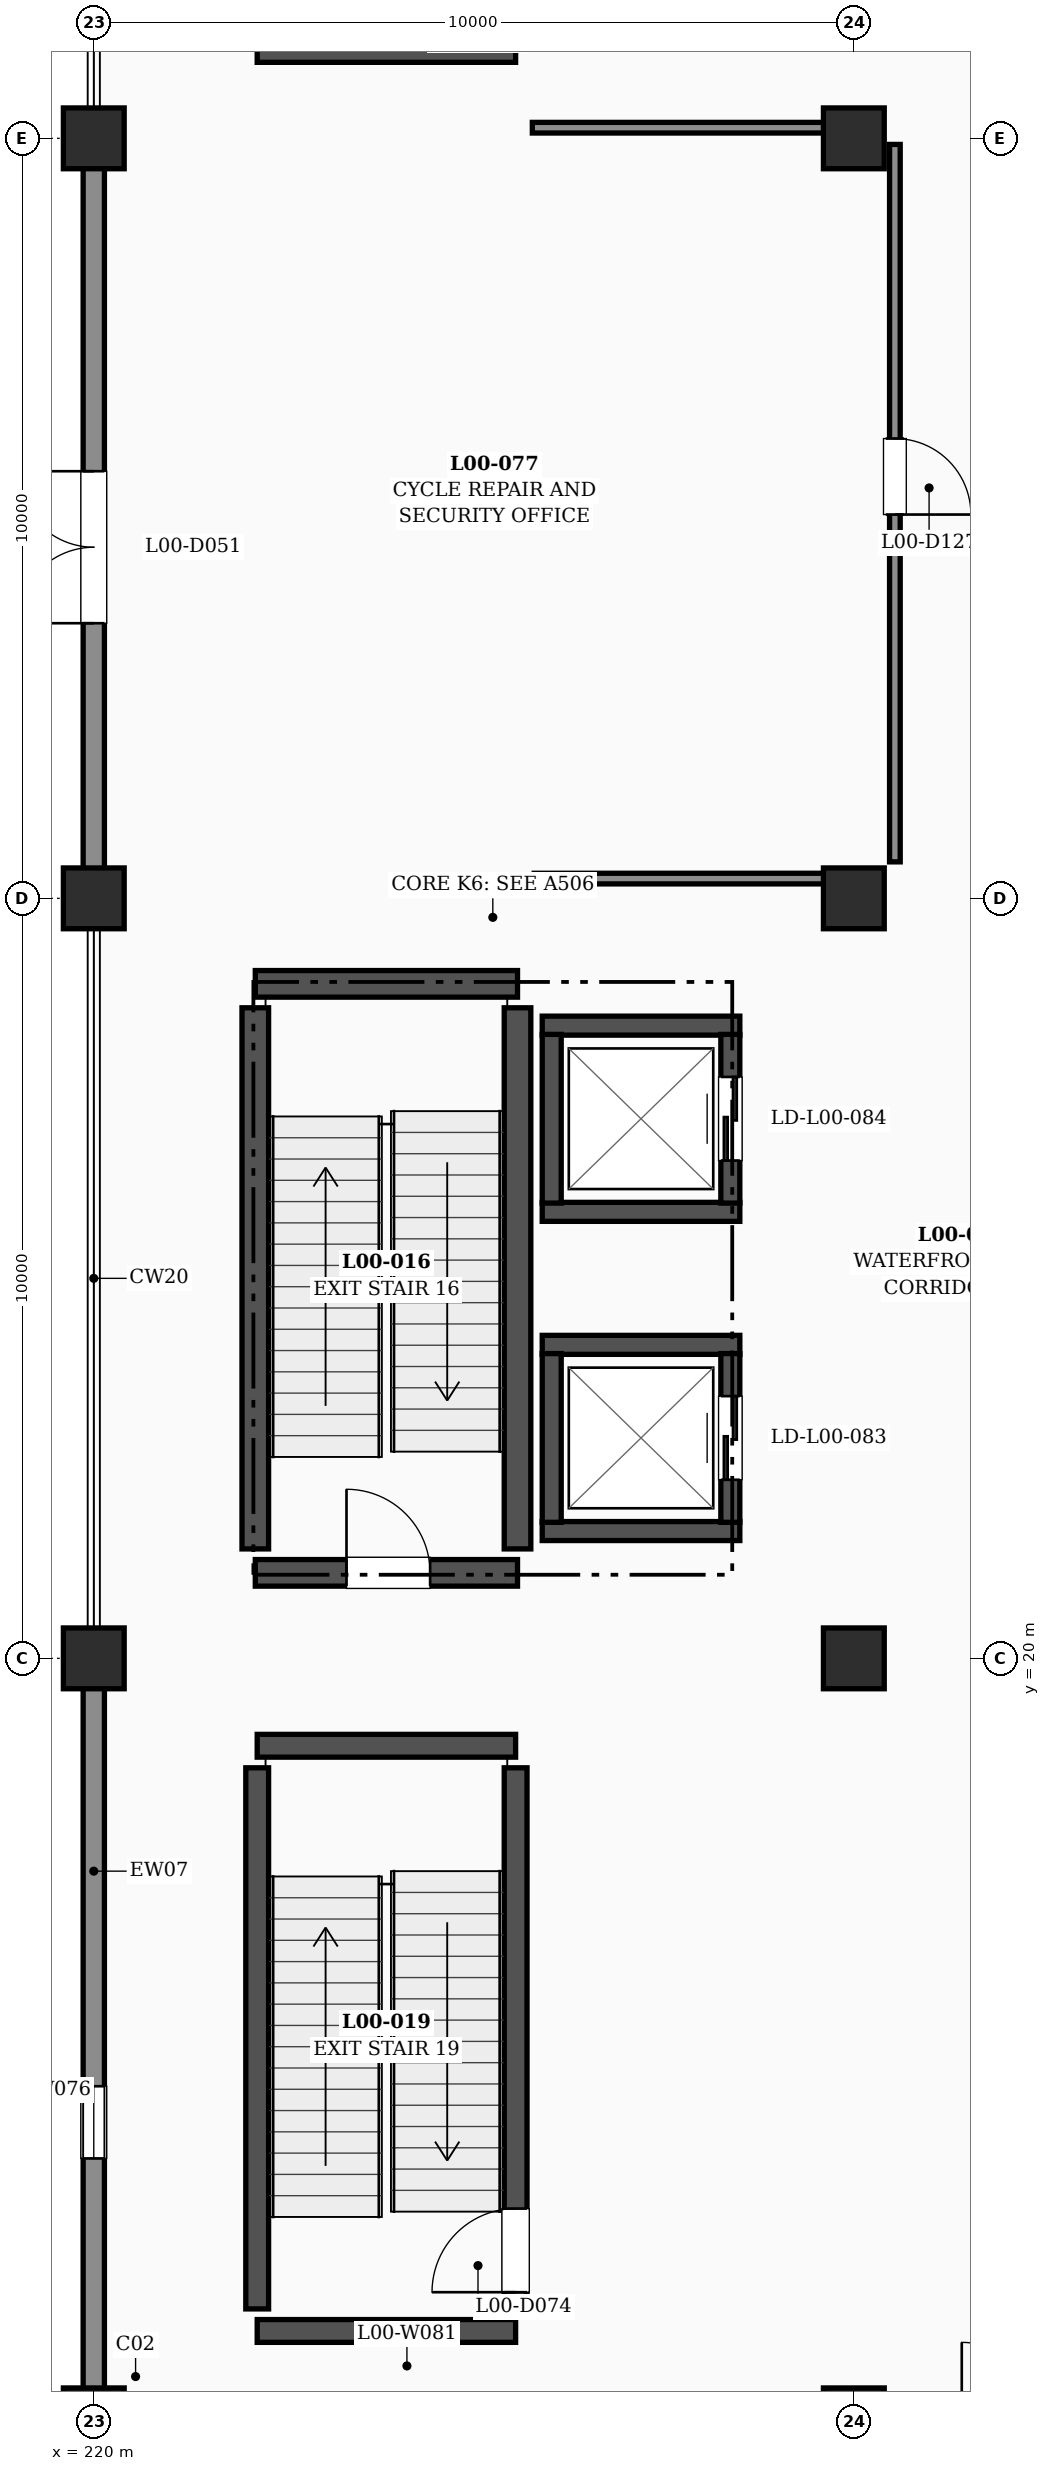
"""IFC4 building model, lengths in metres.
Left out: names, types, materials, properties, quantities, classifications, styles, units other than length and angle.
Written with IfcOpenShell. Run it as: python <this file> out.ifc"""

import sys

from ifc_helpers import new_model, si_unit, direction, frame, frame_2d, origin, origin_2d, place, context, subcontext, project, spatial, rectangle, extrude, element, fill, save


model = new_model("IFC4")
c1 = context("Model", 3, precision=1e-05, world=origin(), true_north=direction((0.0, 1.0)))
c2 = subcontext(c1, "Body", "Model", "MODEL_VIEW")
j1 = project(units=[si_unit("LENGTHUNIT", "METRE"), si_unit("PLANEANGLEUNIT", "RADIAN")], contexts=[c1])
p1 = place(None, origin())
s1 = spatial("IfcSite", under=j1, at=p1, CompositionType="ELEMENT")
p2 = place(p1, origin())
s2 = spatial("IfcBuilding", under=s1, at=p2, CompositionType="ELEMENT")
p3 = place(p2, origin())
s3 = spatial("IfcBuildingStorey", under=s2, at=p3, CompositionType="ELEMENT", Elevation=0.0)
for number, where, z_axis, x_axis in (
    (1, (220.0, 10.0, 0.0), (0.0, 0.0, 1.0), (1.0, 0.0, 0.0)),
    (2, (220.0, 20.0, 0.0), (0.0, 0.0, 1.0), (1.0, 0.0, 0.0)),
    (3, (220.0, 30.0, 0.0), (0.0, 0.0, 1.0), (1.0, 0.0, 0.0)),
    (4, (220.0, 40.0, 0.0), (0.0, 0.0, 1.0), (1.0, 0.0, 0.0)),
    (5, (230.0, 10.0, 0.0), (0.0, 0.0, 1.0), (1.0, 0.0, 0.0)),
    (6, (230.0, 20.0, 0.0), (0.0, 0.0, 1.0), (1.0, 0.0, 0.0)),
    (7, (230.0, 30.0, 0.0), (0.0, 0.0, 1.0), (1.0, 0.0, 0.0)),
    (8, (230.0, 40.0, 0.0), (0.0, 0.0, 1.0), (1.0, 0.0, 0.0)),
):
    element("IfcColumn", number, at=place(p3, frame(where, z_axis=z_axis, x_axis=x_axis)), inside=s3, PredefinedType="COLUMN", context=c2, shape_type="SweptSolid", body=[
        extrude(rectangle(XDim=0.8, YDim=0.8, at=origin_2d()), origin(), (0.0, 0.0, 1.0), 6.0),
    ])
p4 = place(p3, frame((220.0, 10.22, 0.0), z_axis=(0.0, 0.0, 1.0), x_axis=(0.0, 1.0, 0.0)))
e9 = element("IfcWall", 9, at=p4, inside=s3, PredefinedType="SOLIDWALL", context=c2, shape_type="SweptSolid", body=[
    extrude(rectangle(XDim=9.56, YDim=0.28, at=frame_2d((4.78, 0.0))), origin(), (0.0, 0.0, 1.0), 4.96),
])
p5 = place(p4, frame((3.2, 0.0, 0.95)))
e10 = element("IfcOpeningElement", 10, at=p5, cuts=e9, PredefinedType="OPENING", context=c2, shape_type="SweptSolid", body=[
    extrude(rectangle(XDim=0.95, YDim=2.2, at=frame_2d((0.475, 1.1))), frame((0.0, 0.15, 0.0), z_axis=(0.0, -1.0, 0.0), x_axis=(1.0, 0.0, 0.0)), (0.0, 0.0, 1.0), 0.3),
])
p6 = place(p3, frame((220.0, 30.22, 0.0), z_axis=(0.0, 0.0, 1.0), x_axis=(0.0, 1.0, 0.0)))
e11 = element("IfcWall", 11, at=p6, inside=s3, PredefinedType="SOLIDWALL", context=c2, shape_type="SweptSolid", body=[
    extrude(rectangle(XDim=9.56, YDim=0.28, at=frame_2d((4.78, 0.0))), origin(), (0.0, 0.0, 1.0), 4.96),
])
p7 = place(p6, frame((3.4, 0.0, 0.0)))
e12 = element("IfcOpeningElement", 12, at=p7, cuts=e11, PredefinedType="OPENING", context=c2, shape_type="SweptSolid", body=[
    extrude(rectangle(XDim=2.0, YDim=2.4, at=frame_2d((1.0, 1.2))), frame((0.0, 0.15, 0.0), z_axis=(0.0, -1.0, 0.0), x_axis=(1.0, 0.0, 0.0)), (0.0, 0.0, 1.0), 0.3),
])
p8 = place(p3, frame((222.125, 21.125, 0.0), z_axis=(0.0, 0.0, 1.0), x_axis=(1.0, 0.0, 0.0)))
e13 = element("IfcWall", 13, at=p8, inside=s3, PredefinedType="SHEAR", context=c2, shape_type="SweptSolid", body=[
    extrude(rectangle(XDim=3.45, YDim=0.35, at=frame_2d((1.725, 0.0))), origin(), (0.0, 0.0, 1.0), 6.0),
])
p9 = place(p8, frame((1.2, 0.0, 0.0)))
e14 = element("IfcOpeningElement", 14, at=p9, cuts=e13, PredefinedType="OPENING", context=c2, shape_type="SweptSolid", body=[
    extrude(rectangle(XDim=1.1, YDim=2.2, at=frame_2d((0.55, 1.1))), frame((0.0, 0.185, 0.0), z_axis=(0.0, -1.0, 0.0), x_axis=(1.0, 0.0, 0.0)), (0.0, 0.0, 1.0), 0.37),
])
p10 = place(p3, frame((222.125, 28.875, 0.0), z_axis=(0.0, 0.0, 1.0), x_axis=(1.0, 0.0, 0.0)))
e15 = element("IfcWall", 15, at=p10, inside=s3, PredefinedType="SHEAR", context=c2, shape_type="SweptSolid", body=[
    extrude(rectangle(XDim=3.45, YDim=0.35, at=frame_2d((1.725, 0.0))), origin(), (0.0, 0.0, 1.0), 6.0),
])
for number, where, z_axis, x_axis in (
    (16, (222.125, 21.44, 0.0), (0.0, 0.0, 1.0), (0.0, 1.0, 0.0)),
    (17, (225.575, 21.44, 0.0), (0.0, 0.0, 1.0), (0.0, 1.0, 0.0)),
):
    element("IfcWall", number, at=place(p3, frame(where, z_axis=z_axis, x_axis=x_axis)), inside=s3, PredefinedType="SHEAR", context=c2, shape_type="SweptSolid", body=[
        extrude(rectangle(XDim=7.12, YDim=0.35, at=frame_2d((3.56, 0.0))), origin(), (0.0, 0.0, 1.0), 6.0),
    ])
for number, where, z_axis, x_axis in (
    (18, (222.15, 41.15, 0.0), (0.0, 0.0, 1.0), (1.0, 0.0, 0.0)),
    (19, (222.15, 11.15, 0.0), (0.0, 0.0, 1.0), (1.0, 0.0, 0.0)),
    (20, (222.15, 18.85, 0.0), (0.0, 0.0, 1.0), (1.0, 0.0, 0.0)),
):
    element("IfcWall", number, at=place(p3, frame(where, z_axis=z_axis, x_axis=x_axis)), inside=s3, PredefinedType="SHEAR", context=c2, shape_type="SweptSolid", body=[
        extrude(rectangle(XDim=3.4, YDim=0.3, at=frame_2d((1.7, 0.0))), origin(), (0.0, 0.0, 1.0), 6.0),
    ])
p11 = place(p3, frame((222.15, 11.44, 0.0), z_axis=(0.0, 0.0, 1.0), x_axis=(0.0, 1.0, 0.0)))
e21 = element("IfcWall", 21, at=p11, inside=s3, PredefinedType="SHEAR", context=c2, shape_type="SweptSolid", body=[
    extrude(rectangle(XDim=7.12, YDim=0.3, at=frame_2d((3.56, 0.0))), origin(), (0.0, 0.0, 1.0), 6.0),
])
p12 = place(p3, frame((225.55, 11.44, 0.0), z_axis=(0.0, 0.0, 1.0), x_axis=(0.0, 1.0, 0.0)))
e22 = element("IfcWall", 22, at=p12, inside=s3, PredefinedType="SHEAR", context=c2, shape_type="SweptSolid", body=[
    extrude(rectangle(XDim=7.12, YDim=0.3, at=frame_2d((3.56, 0.0))), origin(), (0.0, 0.0, 1.0), 6.0),
])
p13 = place(p12, frame((0.22, 0.0, 0.0)))
e23 = element("IfcOpeningElement", 23, at=p13, cuts=e22, PredefinedType="OPENING", context=c2, shape_type="SweptSolid", body=[
    extrude(rectangle(XDim=1.1, YDim=2.2, at=frame_2d((0.55, 1.1))), frame((0.0, 0.16, 0.0), z_axis=(0.0, -1.0, 0.0), x_axis=(1.0, 0.0, 0.0)), (0.0, 0.0, 1.0), 0.32),
])
for number, where, z_axis, x_axis in (
    (24, (225.9, 21.675, 0.0), (0.0, 0.0, 1.0), (1.0, 0.0, 0.0)),
    (25, (225.9, 24.125, 0.0), (0.0, 0.0, 1.0), (1.0, 0.0, 0.0)),
):
    element("IfcWall", number, at=place(p3, frame(where, z_axis=z_axis, x_axis=x_axis)), inside=s3, PredefinedType="SHEAR", context=c2, shape_type="SweptSolid", body=[
        extrude(rectangle(XDim=2.6, YDim=0.25, at=frame_2d((1.3, 0.0))), origin(), (0.0, 0.0, 1.0), 6.0),
    ])
p14 = place(p3, frame((226.025, 21.79, 0.0), z_axis=(0.0, 0.0, 1.0), x_axis=(0.0, 1.0, 0.0)))
e26 = element("IfcWall", 26, at=p14, inside=s3, PredefinedType="SHEAR", context=c2, shape_type="SweptSolid", body=[
    extrude(rectangle(XDim=2.22, YDim=0.25, at=frame_2d((1.11, 0.0))), origin(), (0.0, 0.0, 1.0), 6.0),
])
p15 = place(p3, frame((228.375, 21.79, 0.0), z_axis=(0.0, 0.0, 1.0), x_axis=(0.0, 1.0, 0.0)))
e27 = element("IfcWall", 27, at=p15, inside=s3, PredefinedType="SHEAR", context=c2, shape_type="SweptSolid", body=[
    extrude(rectangle(XDim=2.22, YDim=0.25, at=frame_2d((1.11, 0.0))), origin(), (0.0, 0.0, 1.0), 6.0),
])
p16 = place(p15, frame((0.56, 0.0, 0.0)))
e28 = element("IfcOpeningElement", 28, at=p16, cuts=e27, PredefinedType="OPENING", context=c2, shape_type="SweptSolid", body=[
    extrude(rectangle(XDim=1.1, YDim=2.2, at=frame_2d((0.55, 1.1))), frame((0.0, 0.135, 0.0), z_axis=(0.0, -1.0, 0.0), x_axis=(1.0, 0.0, 0.0)), (0.0, 0.0, 1.0), 0.27),
])
for number, where, z_axis, x_axis in (
    (29, (225.9, 25.875, 0.0), (0.0, 0.0, 1.0), (1.0, 0.0, 0.0)),
    (30, (225.9, 28.325, 0.0), (0.0, 0.0, 1.0), (1.0, 0.0, 0.0)),
):
    element("IfcWall", number, at=place(p3, frame(where, z_axis=z_axis, x_axis=x_axis)), inside=s3, PredefinedType="SHEAR", context=c2, shape_type="SweptSolid", body=[
        extrude(rectangle(XDim=2.6, YDim=0.25, at=frame_2d((1.3, 0.0))), origin(), (0.0, 0.0, 1.0), 6.0),
    ])
p17 = place(p3, frame((226.025, 25.99, 0.0), z_axis=(0.0, 0.0, 1.0), x_axis=(0.0, 1.0, 0.0)))
e31 = element("IfcWall", 31, at=p17, inside=s3, PredefinedType="SHEAR", context=c2, shape_type="SweptSolid", body=[
    extrude(rectangle(XDim=2.22, YDim=0.25, at=frame_2d((1.11, 0.0))), origin(), (0.0, 0.0, 1.0), 6.0),
])
p18 = place(p3, frame((228.375, 25.99, 0.0), z_axis=(0.0, 0.0, 1.0), x_axis=(0.0, 1.0, 0.0)))
e32 = element("IfcWall", 32, at=p18, inside=s3, PredefinedType="SHEAR", context=c2, shape_type="SweptSolid", body=[
    extrude(rectangle(XDim=2.22, YDim=0.25, at=frame_2d((1.11, 0.0))), origin(), (0.0, 0.0, 1.0), 6.0),
])
p19 = place(p18, frame((0.56, 0.0, 0.0)))
e33 = element("IfcOpeningElement", 33, at=p19, cuts=e32, PredefinedType="OPENING", context=c2, shape_type="SweptSolid", body=[
    extrude(rectangle(XDim=1.1, YDim=2.2, at=frame_2d((0.55, 1.1))), frame((0.0, 0.135, 0.0), z_axis=(0.0, -1.0, 0.0), x_axis=(1.0, 0.0, 0.0)), (0.0, 0.0, 1.0), 0.27),
])
p20 = place(p3, frame((225.77, 40.14, 0.0), z_axis=(0.0, 0.0, 1.0), x_axis=(1.0, 0.0, 0.0)))
e34 = element("IfcWall", 34, at=p20, inside=s3, PredefinedType="PARTITIONING", context=c2, shape_type="SweptSolid", body=[
    extrude(rectangle(XDim=4.55, YDim=0.14, at=frame_2d((2.275, 0.0))), origin(), (0.0, 0.0, 1.0), 4.91),
])
p21 = place(p3, frame((230.54, 39.92, 0.0), z_axis=(0.0, 0.0, 1.0), x_axis=(0.0, -1.0, 0.0)))
e35 = element("IfcWall", 35, at=p21, inside=s3, PredefinedType="PARTITIONING", context=c2, shape_type="SweptSolid", body=[
    extrude(rectangle(XDim=9.44, YDim=0.14, at=frame_2d((4.72, 0.0))), origin(), (0.0, 0.0, 1.0), 5.66),
])
p22 = place(p21, frame((3.87, 0.0, 0.0)))
e36 = element("IfcOpeningElement", 36, at=p22, cuts=e35, PredefinedType="OPENING", context=c2, shape_type="SweptSolid", body=[
    extrude(rectangle(XDim=1.0, YDim=2.2, at=frame_2d((0.5, 1.1))), frame((0.0, 0.08, 0.0), z_axis=(0.0, -1.0, 0.0), x_axis=(1.0, 0.0, 0.0)), (0.0, 0.0, 1.0), 0.16),
])
p23 = place(p3, frame((230.32, 30.26, 0.0), z_axis=(0.0, 0.0, 1.0), x_axis=(-1.0, 0.0, 0.0)))
e37 = element("IfcWall", 37, at=p23, inside=s3, PredefinedType="PARTITIONING", context=c2, shape_type="SweptSolid", body=[
    extrude(rectangle(XDim=4.525, YDim=0.14, at=frame_2d((2.263, 0.0))), origin(), (0.0, 0.0, 1.0), 4.91),
])
p24 = place(p5, origin())
e38 = element("IfcWindow", 38, at=p24, inside=s3, PartitioningType="SINGLE_PANEL", PredefinedType="WINDOW", context=c2, shape_type="SweptSolid", body=[
    extrude(rectangle(XDim=0.95, YDim=2.2, at=frame_2d((0.475, 1.1))), frame((0.0, 0.03, 0.0), z_axis=(0.0, -1.0, 0.0), x_axis=(1.0, 0.0, 0.0)), (0.0, 0.0, 1.0), 0.06),
])
fill(e10, e38)
p25 = place(p7, origin())
e39 = element("IfcDoor", 39, at=p25, inside=s3, OperationType="DOUBLE_DOOR_SINGLE_SWING", PredefinedType="DOOR", context=c2, shape_type="SweptSolid", body=[
    extrude(rectangle(XDim=2.0, YDim=2.4, at=frame_2d((1.0, 1.2))), frame((0.0, 0.025, 0.0), z_axis=(0.0, -1.0, 0.0), x_axis=(1.0, 0.0, 0.0)), (0.0, 0.0, 1.0), 0.05),
])
fill(e12, e39)
p26 = place(p9, origin())
e40 = element("IfcDoor", 40, at=p26, inside=s3, OperationType="SINGLE_SWING_LEFT", PredefinedType="DOOR", context=c2, shape_type="SweptSolid", body=[
    extrude(rectangle(XDim=1.1, YDim=2.2, at=frame_2d((0.55, 1.1))), frame((0.0, 0.025, 0.0), z_axis=(0.0, -1.0, 0.0), x_axis=(1.0, 0.0, 0.0)), (0.0, 0.0, 1.0), 0.05),
])
fill(e14, e40)
p27 = place(p13, origin())
e41 = element("IfcDoor", 41, at=p27, inside=s3, OperationType="SINGLE_SWING_LEFT", PredefinedType="DOOR", context=c2, shape_type="SweptSolid", body=[
    extrude(rectangle(XDim=1.1, YDim=2.2, at=frame_2d((0.55, 1.1))), frame((0.0, 0.025, 0.0), z_axis=(0.0, -1.0, 0.0), x_axis=(1.0, 0.0, 0.0)), (0.0, 0.0, 1.0), 0.05),
])
fill(e23, e41)
p28 = place(p16, origin())
e42 = element("IfcDoor", 42, at=p28, inside=s3, OperationType="DOUBLE_DOOR_SLIDING", PredefinedType="DOOR", context=c2, shape_type="SweptSolid", body=[
    extrude(rectangle(XDim=1.1, YDim=2.2, at=frame_2d((0.55, 1.1))), frame((0.0, 0.025, 0.0), z_axis=(0.0, -1.0, 0.0), x_axis=(1.0, 0.0, 0.0)), (0.0, 0.0, 1.0), 0.05),
])
fill(e28, e42)
p29 = place(p19, origin())
e43 = element("IfcDoor", 43, at=p29, inside=s3, OperationType="DOUBLE_DOOR_SLIDING", PredefinedType="DOOR", context=c2, shape_type="SweptSolid", body=[
    extrude(rectangle(XDim=1.1, YDim=2.2, at=frame_2d((0.55, 1.1))), frame((0.0, 0.025, 0.0), z_axis=(0.0, -1.0, 0.0), x_axis=(1.0, 0.0, 0.0)), (0.0, 0.0, 1.0), 0.05),
])
fill(e33, e43)
p30 = place(p22, origin())
e44 = element("IfcDoor", 44, at=p30, inside=s3, OperationType="SINGLE_SWING_RIGHT", PredefinedType="DOOR", context=c2, shape_type="SweptSolid", body=[
    extrude(rectangle(XDim=1.0, YDim=2.2, at=frame_2d((0.5, 1.1))), frame((0.0, 0.025, 0.0), z_axis=(0.0, -1.0, 0.0), x_axis=(1.0, 0.0, 0.0)), (0.0, 0.0, 1.0), 0.05),
])
fill(e36, e44)
save(model, sys.argv[1])
